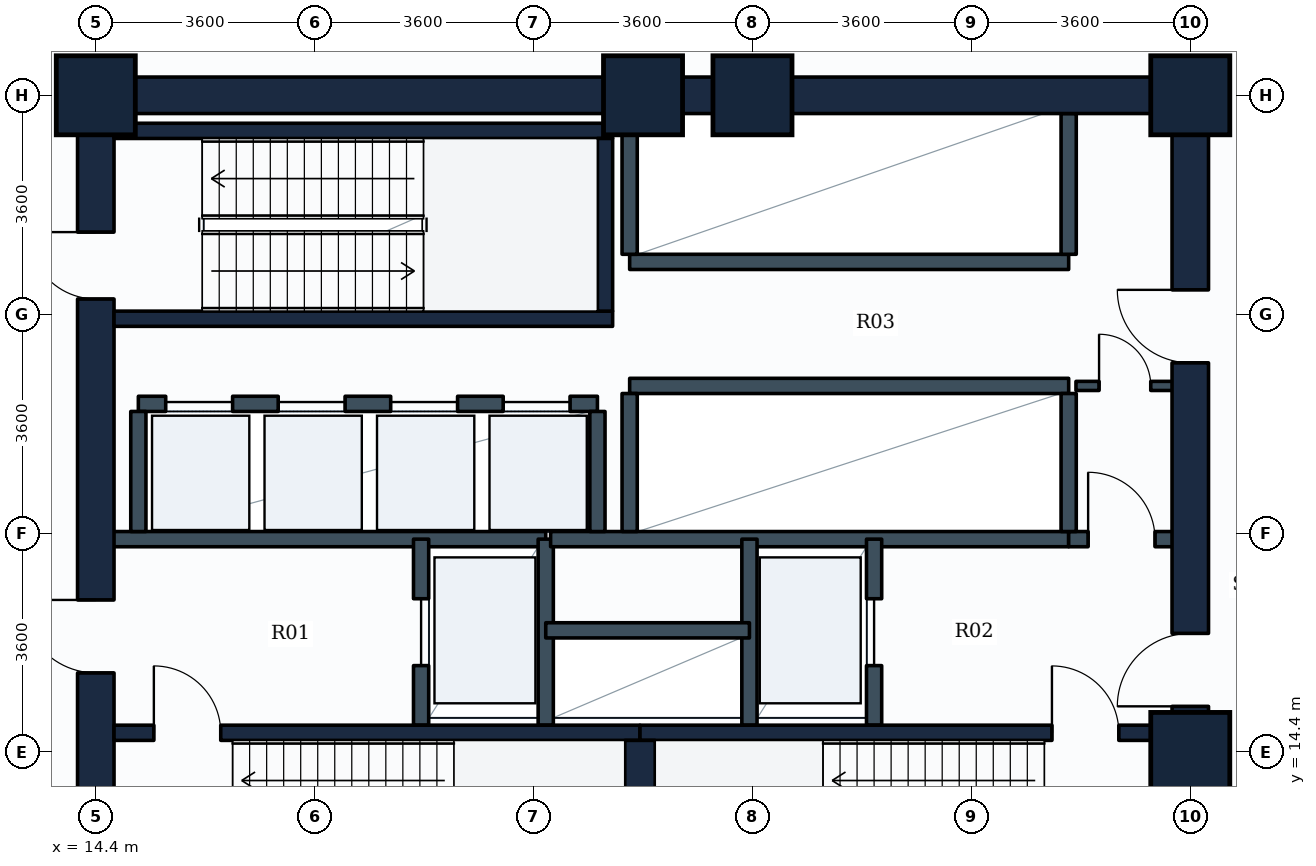
"""IFC4 building model, lengths in metres.
Left out: names, types, materials, properties, quantities, classifications, styles, units other than length and angle.
Written with IfcOpenShell. Run it as: python <this file> out.ifc"""

import sys

from ifc_helpers import new_model, si_unit, direction, frame, frame_2d, origin, origin_2d, place, context, subcontext, project, spatial, rectangle, extrude, element, fill, save


model = new_model("IFC4")
c1 = context("Model", 3, precision=1e-05, world=origin(), true_north=direction((0.0, 1.0)))
c2 = subcontext(c1, "Body", "Model", "MODEL_VIEW")
j1 = project(units=[si_unit("LENGTHUNIT", "METRE"), si_unit("PLANEANGLEUNIT", "RADIAN")], contexts=[c1])
p1 = place(None, origin())
s1 = spatial("IfcSite", under=j1, at=p1, CompositionType="ELEMENT")
p2 = place(p1, origin())
s2 = spatial("IfcBuilding", under=s1, at=p2, CompositionType="ELEMENT")
p3 = place(p2, frame((0.0, 0.0, 5.4)))
s3 = spatial("IfcBuildingStorey", under=s2, at=p3, CompositionType="ELEMENT", Elevation=5.4)
for number, where, z_axis, x_axis in (
    (1, (14.4, 25.2, 0.0), (0.0, 0.0, 1.0), (1.0, 0.0, 0.0)),
    (2, (23.4, 25.2, 0.0), (0.0, 0.0, 1.0), (1.0, 0.0, 0.0)),
    (3, (25.2, 25.2, 0.0), (0.0, 0.0, 1.0), (1.0, 0.0, 0.0)),
    (4, (32.4, 14.4, 0.0), (0.0, 0.0, 1.0), (1.0, 0.0, 0.0)),
    (5, (32.4, 25.2, 0.0), (0.0, 0.0, 1.0), (1.0, 0.0, 0.0)),
):
    element("IfcColumn", number, at=place(p3, frame(where, z_axis=z_axis, x_axis=x_axis)), inside=s3, PredefinedType="COLUMN", context=c2, shape_type="SweptSolid", body=[
        extrude(rectangle(XDim=1.3, YDim=1.3, at=origin_2d()), origin(), (0.0, 0.0, 1.0), 4.8),
    ])
p4 = place(p3, frame((14.4, 25.2, 0.0), z_axis=(0.0, 0.0, 1.0), x_axis=(1.0, 0.0, 0.0)))
e6 = element("IfcWall", 6, at=p4, inside=s3, PredefinedType="SHEAR", context=c2, shape_type="SweptSolid", body=[
    extrude(rectangle(XDim=18.0, YDim=0.6, at=frame_2d((9.0, 0.0))), origin(), (0.0, 0.0, 1.0), 4.5),
])
p5 = place(p3, frame((14.4, 10.8, 0.0), z_axis=(0.0, 0.0, 1.0), x_axis=(0.0, 1.0, 0.0)))
e7 = element("IfcWall", 7, at=p5, inside=s3, PredefinedType="SHEAR", context=c2, shape_type="SweptSolid", body=[
    extrude(rectangle(XDim=14.4, YDim=0.6, at=frame_2d((7.2, 0.0))), origin(), (0.0, 0.0, 1.0), 4.5),
])
p6 = place(p5, frame((11.05, 0.0, 0.0)))
e8 = element("IfcOpeningElement", 8, at=p6, cuts=e7, PredefinedType="OPENING", context=c2, shape_type="SweptSolid", body=[
    extrude(rectangle(XDim=1.1, YDim=2.1, at=frame_2d((0.55, 1.05))), frame((0.0, 0.31, 0.0), z_axis=(0.0, -1.0, 0.0), x_axis=(1.0, 0.0, 0.0)), (0.0, 0.0, 1.0), 0.62),
])
p7 = place(p5, frame((4.9, 0.0, 0.0)))
e9 = element("IfcOpeningElement", 9, at=p7, cuts=e7, PredefinedType="OPENING", context=c2, shape_type="SweptSolid", body=[
    extrude(rectangle(XDim=1.2, YDim=2.1, at=frame_2d((0.6, 1.05))), frame((0.0, 0.31, 0.0), z_axis=(0.0, -1.0, 0.0), x_axis=(1.0, 0.0, 0.0)), (0.0, 0.0, 1.0), 0.62),
])
p8 = place(p3, frame((32.4, 10.8, 0.0), z_axis=(0.0, 0.0, 1.0), x_axis=(0.0, 1.0, 0.0)))
e10 = element("IfcWall", 10, at=p8, inside=s3, PredefinedType="SHEAR", context=c2, shape_type="SweptSolid", body=[
    extrude(rectangle(XDim=14.4, YDim=0.6, at=frame_2d((7.2, 0.0))), origin(), (0.0, 0.0, 1.0), 4.5),
])
p9 = place(p8, frame((4.35, 0.0, 0.0)))
e11 = element("IfcOpeningElement", 11, at=p9, cuts=e10, PredefinedType="OPENING", context=c2, shape_type="SweptSolid", body=[
    extrude(rectangle(XDim=1.2, YDim=2.1, at=frame_2d((0.6, 1.05))), frame((0.0, 0.31, 0.0), z_axis=(0.0, -1.0, 0.0), x_axis=(1.0, 0.0, 0.0)), (0.0, 0.0, 1.0), 0.62),
])
p10 = place(p8, frame((10.0, 0.0, 0.0)))
e12 = element("IfcOpeningElement", 12, at=p10, cuts=e10, PredefinedType="OPENING", context=c2, shape_type="SweptSolid", body=[
    extrude(rectangle(XDim=1.2, YDim=2.1, at=frame_2d((0.6, 1.05))), frame((0.0, 0.31, 0.0), z_axis=(0.0, -1.0, 0.0), x_axis=(1.0, 0.0, 0.0)), (0.0, 0.0, 1.0), 0.62),
])
p11 = place(p3, frame((14.7, 14.715, 0.0), z_axis=(0.0, 0.0, 1.0), x_axis=(1.0, 0.0, 0.0)))
e13 = element("IfcWall", 13, at=p11, inside=s3, PredefinedType="SHEAR", context=c2, shape_type="SweptSolid", body=[
    extrude(rectangle(XDim=8.65, YDim=0.25, at=frame_2d((4.325, 0.0))), origin(), (0.0, 0.0, 1.0), 4.5),
])
p12 = place(p11, frame((0.655, 0.0, 0.0)))
e14 = element("IfcOpeningElement", 14, at=p12, cuts=e13, PredefinedType="OPENING", context=c2, shape_type="SweptSolid", body=[
    extrude(rectangle(XDim=1.1, YDim=2.1, at=frame_2d((0.55, 1.05))), frame((0.0, 0.135, 0.0), z_axis=(0.0, -1.0, 0.0), x_axis=(1.0, 0.0, 0.0)), (0.0, 0.0, 1.0), 0.27),
])
p13 = place(p3, frame((23.35, 14.715, 0.0), z_axis=(0.0, 0.0, 1.0), x_axis=(1.0, 0.0, 0.0)))
e15 = element("IfcWall", 15, at=p13, inside=s3, PredefinedType="SHEAR", context=c2, shape_type="SweptSolid", body=[
    extrude(rectangle(XDim=8.75, YDim=0.25, at=frame_2d((4.375, 0.0))), origin(), (0.0, 0.0, 1.0), 4.5),
])
p14 = place(p13, frame((6.775, 0.0, 0.0)))
e16 = element("IfcOpeningElement", 16, at=p14, cuts=e15, PredefinedType="OPENING", context=c2, shape_type="SweptSolid", body=[
    extrude(rectangle(XDim=1.1, YDim=2.1, at=frame_2d((0.55, 1.05))), frame((0.0, 0.135, 0.0), z_axis=(0.0, -1.0, 0.0), x_axis=(1.0, 0.0, 0.0)), (0.0, 0.0, 1.0), 0.27),
])
p15 = place(p3, frame((23.35, 11.75, 0.0), z_axis=(0.0, 0.0, 1.0), x_axis=(0.0, 1.0, 0.0)))
e17 = element("IfcWall", 17, at=p15, inside=s3, PredefinedType="SHEAR", context=c2, shape_type="SweptSolid", body=[
    extrude(rectangle(XDim=2.84, YDim=0.5, at=frame_2d((1.42, 0.0))), origin(), (0.0, 0.0, 1.0), 4.5),
])
for number, where, z_axis, x_axis in (
    (18, (14.7, 21.525, 0.0), (0.0, 0.0, 1.0), (1.0, 0.0, 0.0)),
    (19, (14.7, 24.615, 0.0), (0.0, 0.0, 1.0), (1.0, 0.0, 0.0)),
):
    element("IfcWall", number, at=place(p3, frame(where, z_axis=z_axis, x_axis=x_axis)), inside=s3, PredefinedType="SHEAR", context=c2, shape_type="SweptSolid", body=[
        extrude(rectangle(XDim=8.2, YDim=0.25, at=frame_2d((4.1, 0.0))), origin(), (0.0, 0.0, 1.0), 4.5),
    ])
p16 = place(p3, frame((22.775, 21.65, 0.0), z_axis=(0.0, 0.0, 1.0), x_axis=(0.0, 1.0, 0.0)))
e20 = element("IfcWall", 20, at=p16, inside=s3, PredefinedType="SHEAR", context=c2, shape_type="SweptSolid", body=[
    extrude(rectangle(XDim=2.84, YDim=0.25, at=frame_2d((1.42, 0.0))), origin(), (0.0, 0.0, 1.0), 4.5),
])
p17 = place(p3, frame((14.65, 17.9, 0.0), z_axis=(0.0, 0.0, 1.0), x_axis=(1.0, 0.0, 0.0)))
e21 = element("IfcWall", 21, at=p17, inside=s3, PredefinedType="PARTITIONING", context=c2, shape_type="SweptSolid", body=[
    extrude(rectangle(XDim=7.15, YDim=0.25, at=frame_2d((3.575, 0.0))), origin(), (0.0, 0.0, 1.0), 4.485),
])
p18 = place(p3, frame((19.75, 14.84, 0.0), z_axis=(0.0, 0.0, 1.0), x_axis=(0.0, 1.0, 0.0)))
e22 = element("IfcWall", 22, at=p18, inside=s3, PredefinedType="PARTITIONING", context=c2, shape_type="SweptSolid", body=[
    extrude(rectangle(XDim=3.06, YDim=0.25, at=frame_2d((1.53, 0.0))), origin(), (0.0, 0.0, 1.0), 4.485),
])
p19 = place(p18, frame((0.98, 0.0, 0.0)))
e23 = element("IfcOpeningElement", 23, at=p19, cuts=e22, PredefinedType="OPENING", context=c2, shape_type="SweptSolid", body=[
    extrude(rectangle(XDim=1.1, YDim=2.1, at=frame_2d((0.55, 1.05))), frame((0.0, 0.135, 0.0), z_axis=(0.0, -1.0, 0.0), x_axis=(1.0, 0.0, 0.0)), (0.0, 0.0, 1.0), 0.27),
])
p20 = place(p3, frame((21.8, 14.84, 0.0), z_axis=(0.0, 0.0, 1.0), x_axis=(0.0, 1.0, 0.0)))
e24 = element("IfcWall", 24, at=p20, inside=s3, PredefinedType="PARTITIONING", context=c2, shape_type="SweptSolid", body=[
    extrude(rectangle(XDim=3.06, YDim=0.25, at=frame_2d((1.53, 0.0))), origin(), (0.0, 0.0, 1.0), 4.485),
])
p21 = place(p3, frame((21.88, 17.9, 0.0), z_axis=(0.0, 0.0, 1.0), x_axis=(1.0, 0.0, 0.0)))
e25 = element("IfcWall", 25, at=p21, inside=s3, PredefinedType="PARTITIONING", context=c2, shape_type="SweptSolid", body=[
    extrude(rectangle(XDim=8.52, YDim=0.25, at=frame_2d((4.26, 0.0))), origin(), (0.0, 0.0, 1.0), 4.485),
])
p22 = place(p3, frame((30.4, 17.9, 0.0), z_axis=(0.0, 0.0, 1.0), x_axis=(1.0, 0.0, 0.0)))
e26 = element("IfcWall", 26, at=p22, inside=s3, PredefinedType="PARTITIONING", context=c2, shape_type="SweptSolid", body=[
    extrude(rectangle(XDim=1.75, YDim=0.25, at=frame_2d((0.875, 0.0))), origin(), (0.0, 0.0, 1.0), 4.485),
])
p23 = place(p22, frame((0.32, 0.0, 0.0)))
e27 = element("IfcOpeningElement", 27, at=p23, cuts=e26, PredefinedType="OPENING", context=c2, shape_type="SweptSolid", body=[
    extrude(rectangle(XDim=1.1, YDim=2.1, at=frame_2d((0.55, 1.05))), frame((0.0, 0.135, 0.0), z_axis=(0.0, -1.0, 0.0), x_axis=(1.0, 0.0, 0.0)), (0.0, 0.0, 1.0), 0.27),
])
p24 = place(p3, frame((25.15, 14.84, 0.0), z_axis=(0.0, 0.0, 1.0), x_axis=(0.0, 1.0, 0.0)))
e28 = element("IfcWall", 28, at=p24, inside=s3, PredefinedType="PARTITIONING", context=c2, shape_type="SweptSolid", body=[
    extrude(rectangle(XDim=3.06, YDim=0.25, at=frame_2d((1.53, 0.0))), origin(), (0.0, 0.0, 1.0), 4.485),
])
p25 = place(p3, frame((27.2, 14.84, 0.0), z_axis=(0.0, 0.0, 1.0), x_axis=(0.0, 1.0, 0.0)))
e29 = element("IfcWall", 29, at=p25, inside=s3, PredefinedType="PARTITIONING", context=c2, shape_type="SweptSolid", body=[
    extrude(rectangle(XDim=3.06, YDim=0.25, at=frame_2d((1.53, 0.0))), origin(), (0.0, 0.0, 1.0), 4.485),
])
p26 = place(p25, frame((0.98, 0.0, 0.0)))
e30 = element("IfcOpeningElement", 30, at=p26, cuts=e29, PredefinedType="OPENING", context=c2, shape_type="SweptSolid", body=[
    extrude(rectangle(XDim=1.1, YDim=2.1, at=frame_2d((0.55, 1.05))), frame((0.0, 0.135, 0.0), z_axis=(0.0, -1.0, 0.0), x_axis=(1.0, 0.0, 0.0)), (0.0, 0.0, 1.0), 0.27),
])
p27 = place(p3, frame((21.8, 16.4, 0.0), z_axis=(0.0, 0.0, 1.0), x_axis=(1.0, 0.0, 0.0)))
e31 = element("IfcWall", 31, at=p27, inside=s3, PredefinedType="PARTITIONING", context=c2, shape_type="SweptSolid", body=[
    extrude(rectangle(XDim=3.35, YDim=0.25, at=frame_2d((1.675, 0.0))), origin(), (0.0, 0.0, 1.0), 4.485),
])
p28 = place(p3, frame((15.1, 20.125, 0.0), z_axis=(0.0, 0.0, 1.0), x_axis=(1.0, 0.0, 0.0)))
e32 = element("IfcWall", 32, at=p28, inside=s3, PredefinedType="PARTITIONING", context=c2, shape_type="SweptSolid", body=[
    extrude(rectangle(XDim=7.55, YDim=0.25, at=frame_2d((3.775, 0.0))), origin(), (0.0, 0.0, 1.0), 4.485),
])
p29 = place(p28, frame((0.45, 0.0, 0.0)))
e33 = element("IfcOpeningElement", 33, at=p29, cuts=e32, PredefinedType="OPENING", context=c2, shape_type="SweptSolid", body=[
    extrude(rectangle(XDim=1.1, YDim=2.1, at=frame_2d((0.55, 1.05))), frame((0.0, 0.135, 0.0), z_axis=(0.0, -1.0, 0.0), x_axis=(1.0, 0.0, 0.0)), (0.0, 0.0, 1.0), 0.27),
])
p30 = place(p28, frame((2.3, 0.0, 0.0)))
e34 = element("IfcOpeningElement", 34, at=p30, cuts=e32, PredefinedType="OPENING", context=c2, shape_type="SweptSolid", body=[
    extrude(rectangle(XDim=1.1, YDim=2.1, at=frame_2d((0.55, 1.05))), frame((0.0, 0.135, 0.0), z_axis=(0.0, -1.0, 0.0), x_axis=(1.0, 0.0, 0.0)), (0.0, 0.0, 1.0), 0.27),
])
p31 = place(p28, frame((4.15, 0.0, 0.0)))
e35 = element("IfcOpeningElement", 35, at=p31, cuts=e32, PredefinedType="OPENING", context=c2, shape_type="SweptSolid", body=[
    extrude(rectangle(XDim=1.1, YDim=2.1, at=frame_2d((0.55, 1.05))), frame((0.0, 0.135, 0.0), z_axis=(0.0, -1.0, 0.0), x_axis=(1.0, 0.0, 0.0)), (0.0, 0.0, 1.0), 0.27),
])
p32 = place(p28, frame((6.0, 0.0, 0.0)))
e36 = element("IfcOpeningElement", 36, at=p32, cuts=e32, PredefinedType="OPENING", context=c2, shape_type="SweptSolid", body=[
    extrude(rectangle(XDim=1.1, YDim=2.1, at=frame_2d((0.55, 1.05))), frame((0.0, 0.135, 0.0), z_axis=(0.0, -1.0, 0.0), x_axis=(1.0, 0.0, 0.0)), (0.0, 0.0, 1.0), 0.27),
])
for number, where, z_axis, x_axis in (
    (37, (15.1, 18.025, 0.0), (0.0, 0.0, 1.0), (0.0, 1.0, 0.0)),
    (38, (22.65, 18.025, 0.0), (0.0, 0.0, 1.0), (0.0, 1.0, 0.0)),
):
    element("IfcWall", number, at=place(p3, frame(where, z_axis=z_axis, x_axis=x_axis)), inside=s3, PredefinedType="PARTITIONING", context=c2, shape_type="SweptSolid", body=[
        extrude(rectangle(XDim=1.975, YDim=0.25, at=frame_2d((0.988, 0.0))), origin(), (0.0, 0.0, 1.0), 4.485),
    ])
p33 = place(p3, frame((23.18, 20.42, 0.0), z_axis=(0.0, 0.0, 1.0), x_axis=(1.0, 0.0, 0.0)))
e39 = element("IfcWall", 39, at=p33, inside=s3, PredefinedType="PARTITIONING", context=c2, shape_type="SweptSolid", body=[
    extrude(rectangle(XDim=7.22, YDim=0.25, at=frame_2d((3.61, 0.0))), origin(), (0.0, 0.0, 1.0), 4.485),
])
for number, where, z_axis, x_axis in (
    (40, (23.18, 18.025, 0.0), (0.0, 0.0, 1.0), (0.0, 1.0, 0.0)),
    (41, (30.4, 18.025, 0.0), (0.0, 0.0, 1.0), (0.0, 1.0, 0.0)),
):
    element("IfcWall", number, at=place(p3, frame(where, z_axis=z_axis, x_axis=x_axis)), inside=s3, PredefinedType="PARTITIONING", context=c2, shape_type="SweptSolid", body=[
        extrude(rectangle(XDim=2.27, YDim=0.25, at=frame_2d((1.135, 0.0))), origin(), (0.0, 0.0, 1.0), 4.485),
    ])
p34 = place(p3, frame((23.18, 22.46, 0.0), z_axis=(0.0, 0.0, 1.0), x_axis=(1.0, 0.0, 0.0)))
e42 = element("IfcWall", 42, at=p34, inside=s3, PredefinedType="PARTITIONING", context=c2, shape_type="SweptSolid", body=[
    extrude(rectangle(XDim=7.22, YDim=0.25, at=frame_2d((3.61, 0.0))), origin(), (0.0, 0.0, 1.0), 4.485),
])
for number, where, z_axis, x_axis in (
    (43, (23.18, 22.585, 0.0), (0.0, 0.0, 1.0), (0.0, 1.0, 0.0)),
    (44, (30.4, 22.585, 0.0), (0.0, 0.0, 1.0), (0.0, 1.0, 0.0)),
):
    element("IfcWall", number, at=place(p3, frame(where, z_axis=z_axis, x_axis=x_axis)), inside=s3, PredefinedType="PARTITIONING", context=c2, shape_type="SweptSolid", body=[
        extrude(rectangle(XDim=2.315, YDim=0.25, at=frame_2d((1.157, 0.0))), origin(), (0.0, 0.0, 1.0), 4.485),
    ])
p35 = place(p3, frame((30.52, 20.42, 0.0), z_axis=(0.0, 0.0, 1.0), x_axis=(1.0, 0.0, 0.0)))
e45 = element("IfcWall", 45, at=p35, inside=s3, PredefinedType="PARTITIONING", context=c2, shape_type="SweptSolid", body=[
    extrude(rectangle(XDim=1.63, YDim=0.15, at=frame_2d((0.815, 0.0))), origin(), (0.0, 0.0, 1.0), 4.485),
])
p36 = place(p35, frame((0.38, 0.0, 0.0)))
e46 = element("IfcOpeningElement", 46, at=p36, cuts=e45, PredefinedType="OPENING", context=c2, shape_type="SweptSolid", body=[
    extrude(rectangle(XDim=0.85, YDim=2.1, at=frame_2d((0.425, 1.05))), frame((0.0, 0.085, 0.0), z_axis=(0.0, -1.0, 0.0), x_axis=(1.0, 0.0, 0.0)), (0.0, 0.0, 1.0), 0.17),
])
p37 = place(p12, origin())
e47 = element("IfcDoor", 47, at=p37, inside=s3, OperationType="SINGLE_SWING_LEFT", PredefinedType="DOOR", context=c2, shape_type="SweptSolid", body=[
    extrude(rectangle(XDim=1.1, YDim=2.1, at=frame_2d((0.55, 1.05))), frame((0.0, 0.025, 0.0), z_axis=(0.0, -1.0, 0.0), x_axis=(1.0, 0.0, 0.0)), (0.0, 0.0, 1.0), 0.05),
])
fill(e14, e47)
p38 = place(p14, origin())
e48 = element("IfcDoor", 48, at=p38, inside=s3, OperationType="SINGLE_SWING_LEFT", PredefinedType="DOOR", context=c2, shape_type="SweptSolid", body=[
    extrude(rectangle(XDim=1.1, YDim=2.1, at=frame_2d((0.55, 1.05))), frame((0.0, 0.025, 0.0), z_axis=(0.0, -1.0, 0.0), x_axis=(1.0, 0.0, 0.0)), (0.0, 0.0, 1.0), 0.05),
])
fill(e16, e48)
p39 = place(p6, origin())
e49 = element("IfcDoor", 49, at=p39, inside=s3, OperationType="SINGLE_SWING_RIGHT", PredefinedType="DOOR", context=c2, shape_type="SweptSolid", body=[
    extrude(rectangle(XDim=1.1, YDim=2.1, at=frame_2d((0.55, 1.05))), frame((0.0, 0.025, 0.0), z_axis=(0.0, -1.0, 0.0), x_axis=(1.0, 0.0, 0.0)), (0.0, 0.0, 1.0), 0.05),
])
fill(e8, e49)
p40 = place(p19, origin())
e50 = element("IfcDoor", 50, at=p40, inside=s3, OperationType="SLIDING_TO_LEFT", PredefinedType="DOOR", context=c2, shape_type="SweptSolid", body=[
    extrude(rectangle(XDim=1.1, YDim=2.1, at=frame_2d((0.55, 1.05))), frame((0.0, 0.025, 0.0), z_axis=(0.0, -1.0, 0.0), x_axis=(1.0, 0.0, 0.0)), (0.0, 0.0, 1.0), 0.05),
])
fill(e23, e50)
p41 = place(p26, origin())
e51 = element("IfcDoor", 51, at=p41, inside=s3, OperationType="SLIDING_TO_LEFT", PredefinedType="DOOR", context=c2, shape_type="SweptSolid", body=[
    extrude(rectangle(XDim=1.1, YDim=2.1, at=frame_2d((0.55, 1.05))), frame((0.0, 0.025, 0.0), z_axis=(0.0, -1.0, 0.0), x_axis=(1.0, 0.0, 0.0)), (0.0, 0.0, 1.0), 0.05),
])
fill(e30, e51)
p42 = place(p7, origin())
e52 = element("IfcDoor", 52, at=p42, inside=s3, OperationType="SINGLE_SWING_RIGHT", PredefinedType="DOOR", context=c2, shape_type="SweptSolid", body=[
    extrude(rectangle(XDim=1.2, YDim=2.1, at=frame_2d((0.6, 1.05))), frame((0.0, 0.025, 0.0), z_axis=(0.0, -1.0, 0.0), x_axis=(1.0, 0.0, 0.0)), (0.0, 0.0, 1.0), 0.05),
])
fill(e9, e52)
p43 = place(p9, origin())
e53 = element("IfcDoor", 53, at=p43, inside=s3, OperationType="SINGLE_SWING_LEFT", PredefinedType="DOOR", context=c2, shape_type="SweptSolid", body=[
    extrude(rectangle(XDim=1.2, YDim=2.1, at=frame_2d((0.6, 1.05))), frame((0.0, 0.025, 0.0), z_axis=(0.0, -1.0, 0.0), x_axis=(1.0, 0.0, 0.0)), (0.0, 0.0, 1.0), 0.05),
])
fill(e11, e53)
p44 = place(p23, origin())
e54 = element("IfcDoor", 54, at=p44, inside=s3, OperationType="SINGLE_SWING_LEFT", PredefinedType="DOOR", context=c2, shape_type="SweptSolid", body=[
    extrude(rectangle(XDim=1.1, YDim=2.1, at=frame_2d((0.55, 1.05))), frame((0.0, 0.025, 0.0), z_axis=(0.0, -1.0, 0.0), x_axis=(1.0, 0.0, 0.0)), (0.0, 0.0, 1.0), 0.05),
])
fill(e27, e54)
p45 = place(p29, origin())
e55 = element("IfcDoor", 55, at=p45, inside=s3, OperationType="SLIDING_TO_LEFT", PredefinedType="DOOR", context=c2, shape_type="SweptSolid", body=[
    extrude(rectangle(XDim=1.1, YDim=2.1, at=frame_2d((0.55, 1.05))), frame((0.0, 0.025, 0.0), z_axis=(0.0, -1.0, 0.0), x_axis=(1.0, 0.0, 0.0)), (0.0, 0.0, 1.0), 0.05),
])
fill(e33, e55)
p46 = place(p30, origin())
e56 = element("IfcDoor", 56, at=p46, inside=s3, OperationType="SLIDING_TO_LEFT", PredefinedType="DOOR", context=c2, shape_type="SweptSolid", body=[
    extrude(rectangle(XDim=1.1, YDim=2.1, at=frame_2d((0.55, 1.05))), frame((0.0, 0.025, 0.0), z_axis=(0.0, -1.0, 0.0), x_axis=(1.0, 0.0, 0.0)), (0.0, 0.0, 1.0), 0.05),
])
fill(e34, e56)
p47 = place(p31, origin())
e57 = element("IfcDoor", 57, at=p47, inside=s3, OperationType="SLIDING_TO_LEFT", PredefinedType="DOOR", context=c2, shape_type="SweptSolid", body=[
    extrude(rectangle(XDim=1.1, YDim=2.1, at=frame_2d((0.55, 1.05))), frame((0.0, 0.025, 0.0), z_axis=(0.0, -1.0, 0.0), x_axis=(1.0, 0.0, 0.0)), (0.0, 0.0, 1.0), 0.05),
])
fill(e35, e57)
p48 = place(p32, origin())
e58 = element("IfcDoor", 58, at=p48, inside=s3, OperationType="SLIDING_TO_LEFT", PredefinedType="DOOR", context=c2, shape_type="SweptSolid", body=[
    extrude(rectangle(XDim=1.1, YDim=2.1, at=frame_2d((0.55, 1.05))), frame((0.0, 0.025, 0.0), z_axis=(0.0, -1.0, 0.0), x_axis=(1.0, 0.0, 0.0)), (0.0, 0.0, 1.0), 0.05),
])
fill(e36, e58)
p49 = place(p10, origin())
e59 = element("IfcDoor", 59, at=p49, inside=s3, OperationType="SINGLE_SWING_RIGHT", PredefinedType="DOOR", context=c2, shape_type="SweptSolid", body=[
    extrude(rectangle(XDim=1.2, YDim=2.1, at=frame_2d((0.6, 1.05))), frame((0.0, 0.025, 0.0), z_axis=(0.0, -1.0, 0.0), x_axis=(1.0, 0.0, 0.0)), (0.0, 0.0, 1.0), 0.05),
])
fill(e12, e59)
p50 = place(p36, origin())
e60 = element("IfcDoor", 60, at=p50, inside=s3, OperationType="SINGLE_SWING_LEFT", PredefinedType="DOOR", context=c2, shape_type="SweptSolid", body=[
    extrude(rectangle(XDim=0.85, YDim=2.1, at=frame_2d((0.425, 1.05))), frame((0.0, 0.025, 0.0), z_axis=(0.0, -1.0, 0.0), x_axis=(1.0, 0.0, 0.0)), (0.0, 0.0, 1.0), 0.05),
])
fill(e46, e60)
save(model, sys.argv[1])
